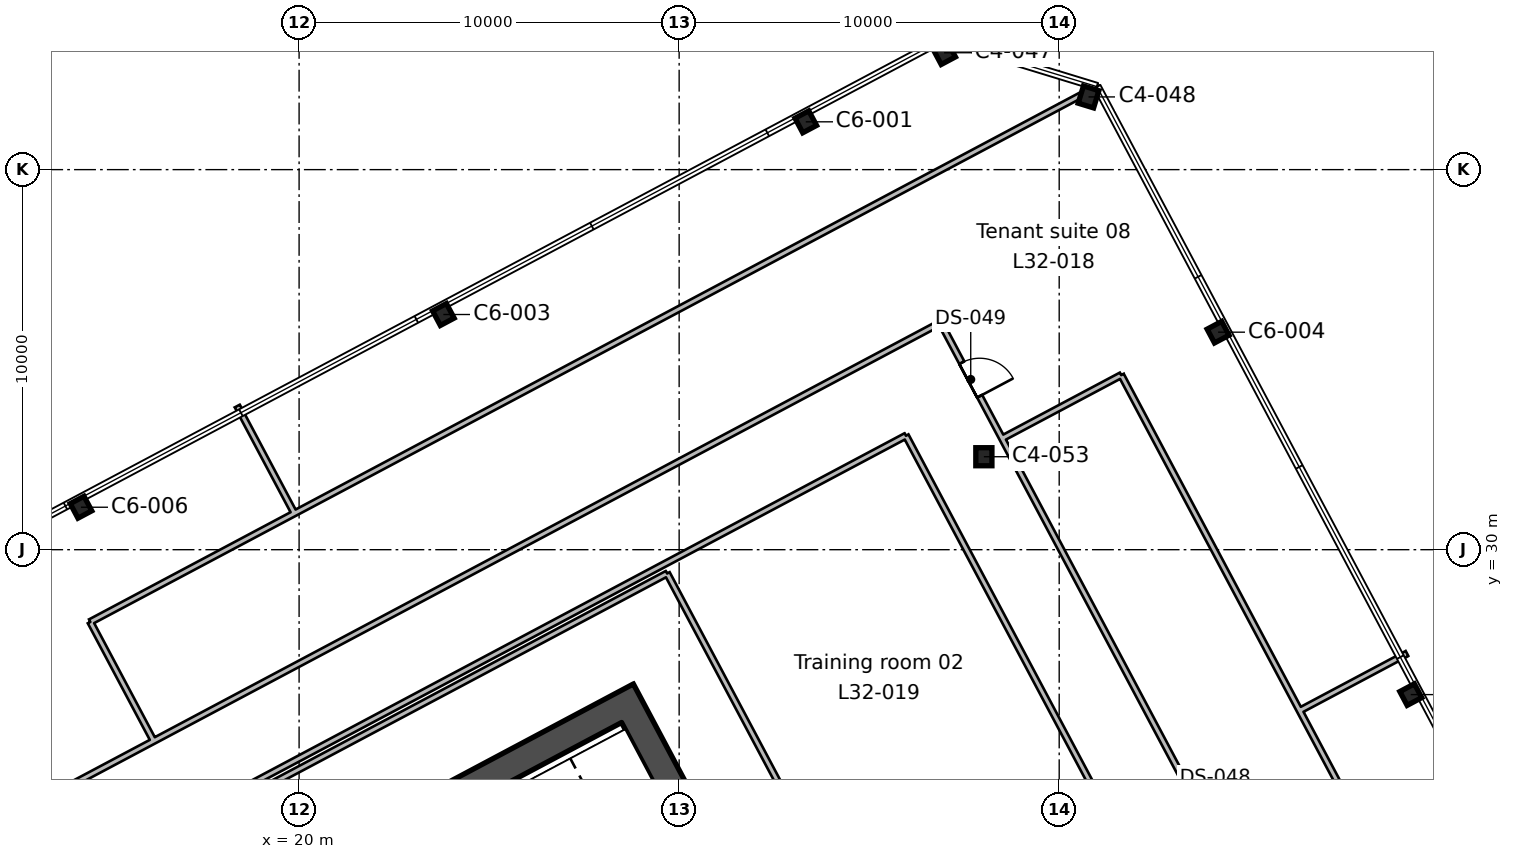
"""IFC4 building model, lengths in metres.
Left out: names, types, materials, properties, quantities, classifications, styles, units other than length and angle.
Written with IfcOpenShell. Run it as: python <this file> out.ifc"""

import sys

from ifc_helpers import new_model, si_unit, direction, frame, frame_2d, origin, origin_2d, place, context, subcontext, project, spatial, rectangle, i_section, extrude, element, fill, save


model = new_model("IFC4")
c1 = context("Model", 3, precision=1e-05, world=origin(), true_north=direction((0.0, 1.0)))
c2 = subcontext(c1, "Body", "Model", "MODEL_VIEW")
j1 = project(units=[si_unit("LENGTHUNIT", "METRE"), si_unit("PLANEANGLEUNIT", "RADIAN")], contexts=[c1])
p1 = place(None, origin())
s1 = spatial("IfcSite", under=j1, at=p1, CompositionType="ELEMENT")
p2 = place(p1, origin())
s2 = spatial("IfcBuilding", under=s1, at=p2, CompositionType="ELEMENT")
p3 = place(p2, frame((0.0, 0.0, 154.2)))
s3 = spatial("IfcBuildingStorey", under=s2, at=p3, CompositionType="ELEMENT", Elevation=154.2)
for number, where, z_axis, x_axis in (
    (1, (49.251, 26.187, 0.0), (0.0, 0.0, 1.0), (-0.469, 0.883, 0.0)),
    (2, (14.261, 31.117, 0.0), (0.0, 0.0, 1.0), (-0.883, -0.469, 0.0)),
):
    element("IfcColumn", number, at=place(p3, frame(where, z_axis=z_axis, x_axis=x_axis)), inside=s3, PredefinedType="COLUMN", context=c2, shape_type="SweptSolid", body=[
        extrude(i_section(OverallWidth=0.412, OverallDepth=0.434, WebThickness=0.036, FlangeThickness=0.057, FilletRadius=0.015, at=origin_2d()), origin(), (0.0, 0.0, 1.0), 4.0),
    ])
p4 = place(p3, frame((38.018, 32.446, 0.0), z_axis=(0.0, 0.0, 1.0), x_axis=(1.0, 0.0, 0.0)))
e3 = element("IfcColumn", 3, at=p4, inside=s3, PredefinedType="COLUMN", context=c2, shape_type="SweptSolid", body=[
    extrude(i_section(OverallWidth=0.424, OverallDepth=0.475, WebThickness=0.048, FlangeThickness=0.077, FilletRadius=0.015, at=origin_2d()), origin(), (0.0, 0.0, 1.0), 4.0),
])
for number, where, z_axis, x_axis in (
    (4, (44.181, 35.723, 0.0), (0.0, 0.0, 1.0), (-0.469, 0.883, 0.0)),
    (5, (23.796, 36.188, 0.0), (0.0, 0.0, 1.0), (-0.883, -0.469, 0.0)),
    (6, (33.332, 41.258, 0.0), (0.0, 0.0, 1.0), (-0.883, -0.469, 0.0)),
):
    element("IfcColumn", number, at=place(p3, frame(where, z_axis=z_axis, x_axis=x_axis)), inside=s3, PredefinedType="COLUMN", context=c2, shape_type="SweptSolid", body=[
        extrude(i_section(OverallWidth=0.412, OverallDepth=0.434, WebThickness=0.036, FlangeThickness=0.057, FilletRadius=0.015, at=origin_2d()), origin(), (0.0, 0.0, 1.0), 4.0),
    ])
for number, where, z_axis, x_axis in (
    (7, (40.772, 41.913, 0.0), (0.0, 0.0, 1.0), (-0.956, 0.292, 0.0)),
    (8, (36.971, 43.076, 0.0), (0.0, 0.0, 1.0), (-0.883, -0.469, 0.0)),
):
    element("IfcColumn", number, at=place(p3, frame(where, z_axis=z_axis, x_axis=x_axis)), inside=s3, PredefinedType="COLUMN", context=c2, shape_type="SweptSolid", body=[
        extrude(i_section(OverallWidth=0.424, OverallDepth=0.475, WebThickness=0.048, FlangeThickness=0.077, FilletRadius=0.015, at=origin_2d()), origin(), (0.0, 0.0, 1.0), 4.0),
    ])
p5 = place(p3, frame((37.713, 8.896, 0.0), z_axis=(0.0, 0.0, 1.0), x_axis=(-0.469469918705, 0.88294846703, 0.0)))
e9 = element("IfcWall", 9, at=p5, inside=s3, PredefinedType="SHEAR", context=c2, shape_type="SweptSolid", body=[
    extrude(rectangle(XDim=19.7, YDim=0.75, at=frame_2d((9.85, 0.0))), origin(), (0.0, 0.0, 1.0), 4.0),
])
p6 = place(p5, frame((10.45, 0.0, 0.0)))
e10 = element("IfcOpeningElement", 10, at=p6, cuts=e9, PredefinedType="OPENING", context=c2, shape_type="SweptSolid", body=[
    extrude(rectangle(XDim=2.4, YDim=2.4, at=frame_2d((1.2, 1.2))), frame((0.0, 0.385, 0.0), z_axis=(0.0, -1.0, 0.0), x_axis=(1.0, 0.0, 0.0)), (0.0, 0.0, 1.0), 0.77),
])
p7 = place(p3, frame((10.474, 16.3, 0.0), z_axis=(0.0, 0.0, 1.0), x_axis=(0.88295010195, 0.469466843842, 0.0)))
e11 = element("IfcWall", 11, at=p7, inside=s3, PredefinedType="SHEAR", context=c2, shape_type="SweptSolid", body=[
    extrude(rectangle(XDim=20.2, YDim=0.75, at=frame_2d((10.1, 0.0))), origin(), (0.0, 0.0, 1.0), 4.0),
])
p8 = place(p3, frame((0.0, 16.366, 0.0), z_axis=(0.0, 0.0, 1.0), x_axis=(0.882949964187, 0.469467102939, 0.0)))
e12 = element("IfcWall", 12, at=p8, inside=s3, PredefinedType="PARTITIONING", context=c2, shape_type="SweptSolid", body=[
    extrude(rectangle(XDim=18.542, YDim=0.15, at=frame_2d((9.271, 0.0))), origin(), (0.0, 0.0, 1.0), 3.64),
])
p9 = place(p3, frame((0.0, 13.874, 0.0), z_axis=(0.0, 0.0, 1.0), x_axis=(0.882942852858, 0.469480477322, 0.0)))
e13 = element("IfcWall", 13, at=p9, inside=s3, PredefinedType="PARTITIONING", context=c2, shape_type="SweptSolid", body=[
    extrude(rectangle(XDim=40.737, YDim=0.15, at=frame_2d((20.368, 0.0))), origin(), (0.0, 0.0, 1.0), 3.64),
])
p10 = place(p9, frame((5.45, 0.0, 0.0)))
e14 = element("IfcOpeningElement", 14, at=p10, cuts=e13, PredefinedType="OPENING", context=c2, shape_type="SweptSolid", body=[
    extrude(rectangle(XDim=1.8, YDim=2.1, at=frame_2d((0.9, 1.05))), frame((0.0, 0.085, 0.0), z_axis=(0.0, -1.0, 0.0), x_axis=(1.0, 0.0, 0.0)), (0.0, 0.0, 1.0), 0.17),
])
p11 = place(p3, frame((35.968, 32.999, 0.0), z_axis=(0.0, 0.0, 1.0), x_axis=(0.469455871296, -0.882955935993, 0.0)))
e15 = element("IfcWall", 15, at=p11, inside=s3, PredefinedType="PARTITIONING", context=c2, shape_type="SweptSolid", body=[
    extrude(rectangle(XDim=22.5, YDim=0.15, at=frame_2d((11.25, 0.0))), origin(), (0.0, 0.0, 1.0), 3.64),
])
p12 = place(p3, frame((40.13, 9.729, 0.0), z_axis=(0.0, 0.0, 1.0), x_axis=(-0.469484128043, 0.882940911679, 0.0)))
e16 = element("IfcWall", 16, at=p12, inside=s3, PredefinedType="PARTITIONING", context=c2, shape_type="SweptSolid", body=[
    extrude(rectangle(XDim=22.25, YDim=0.15, at=frame_2d((11.125, 0.0))), origin(), (0.0, 0.0, 1.0), 3.64),
])
p13 = place(p3, frame((29.684, 29.374, 0.0), z_axis=(0.0, 0.0, 1.0), x_axis=(-0.882945936391, -0.469474678136, 0.0)))
e17 = element("IfcWall", 17, at=p13, inside=s3, PredefinedType="PARTITIONING", context=c2, shape_type="SweptSolid", body=[
    extrude(rectangle(XDim=25.999, YDim=0.15, at=frame_2d((13.0, 0.0))), origin(), (0.0, 0.0, 1.0), 3.64),
])
p14 = place(p3, frame((19.835, 30.933, 0.0), z_axis=(0.0, 0.0, 1.0), x_axis=(-0.882907712877, -0.46954655844, 0.0)))
e18 = element("IfcWall", 18, at=p14, inside=s3, PredefinedType="PARTITIONING", context=c2, shape_type="SweptSolid", body=[
    extrude(rectangle(XDim=6.036, YDim=0.15, at=frame_2d((3.018, 0.0))), origin(), (0.0, 0.0, 1.0), 3.64),
])
p15 = place(p3, frame((14.506, 28.099, 0.0), z_axis=(0.0, 0.0, 1.0), x_axis=(0.469501472662, -0.882931688846, 0.0)))
e19 = element("IfcWall", 19, at=p15, inside=s3, PredefinedType="PARTITIONING", context=c2, shape_type="SweptSolid", body=[
    extrude(rectangle(XDim=3.522, YDim=0.15, at=frame_2d((1.761, 0.0))), origin(), (0.0, 0.0, 1.0), 3.64),
])
p16 = place(p3, frame((38.494, 32.934, 0.0), z_axis=(0.0, 0.0, 1.0), x_axis=(-0.469590631125, 0.882884272801, 0.0)))
e20 = element("IfcWall", 20, at=p16, inside=s3, PredefinedType="PARTITIONING", context=c2, shape_type="SweptSolid", body=[
    extrude(rectangle(XDim=3.443, YDim=0.15, at=frame_2d((1.722, 0.0))), origin(), (0.0, 0.0, 1.0), 3.64),
])
p17 = place(p16, frame((1.25, 0.0, 0.0)))
e21 = element("IfcOpeningElement", 21, at=p17, cuts=e20, PredefinedType="OPENING", context=c2, shape_type="SweptSolid", body=[
    extrude(rectangle(XDim=1.0, YDim=2.1, at=frame_2d((0.5, 1.05))), frame((0.0, 0.085, 0.0), z_axis=(0.0, -1.0, 0.0), x_axis=(1.0, 0.0, 0.0)), (0.0, 0.0, 1.0), 0.17),
])
p18 = place(p3, frame((16.372, 25.071, 0.0), z_axis=(0.0, 0.0, 1.0), x_axis=(0.88294906825, 0.469468787968, 0.0)))
e22 = element("IfcWall", 22, at=p18, inside=s3, PredefinedType="PARTITIONING", context=c2, shape_type="SweptSolid", body=[
    extrude(rectangle(XDim=23.224, YDim=0.15, at=frame_2d((11.612, 0.0))), origin(), (0.0, 0.0, 1.0), 3.64),
])
p19 = place(p3, frame((18.374, 33.78, 0.0), z_axis=(0.0, 0.0, 1.0), x_axis=(0.469685095616, -0.882834022315, 0.0)))
e23 = element("IfcWall", 23, at=p19, inside=s3, PredefinedType="PARTITIONING", context=c2, shape_type="SweptSolid", body=[
    extrude(rectangle(XDim=3.2, YDim=0.15, at=frame_2d((1.6, 0.0))), origin(), (0.0, 0.0, 1.0), 3.64),
])
p20 = place(p3, frame((19.835, 30.933, 0.0), z_axis=(0.0, 0.0, 1.0), x_axis=(0.88295274069, 0.469461880995, 0.0)))
e24 = element("IfcWall", 24, at=p20, inside=s3, PredefinedType="PARTITIONING", context=c2, shape_type="SweptSolid", body=[
    extrude(rectangle(XDim=23.476, YDim=0.15, at=frame_2d((11.738, 0.0))), origin(), (0.0, 0.0, 1.0), 3.64),
])
p21 = place(p3, frame((38.494, 32.934, 0.0), z_axis=(0.0, 0.0, 1.0), x_axis=(0.469489027753, -0.88293830635, 0.0)))
e25 = element("IfcWall", 25, at=p21, inside=s3, PredefinedType="PARTITIONING", context=c2, shape_type="SweptSolid", body=[
    extrude(rectangle(XDim=23.456, YDim=0.15, at=frame_2d((11.728, 0.0))), origin(), (0.0, 0.0, 1.0), 3.64),
])
p22 = place(p21, frame((11.45, 0.0, 0.0)))
e26 = element("IfcOpeningElement", 26, at=p22, cuts=e25, PredefinedType="OPENING", context=c2, shape_type="SweptSolid", body=[
    extrude(rectangle(XDim=1.0, YDim=2.1, at=frame_2d((0.5, 1.05))), frame((0.0, 0.085, 0.0), z_axis=(0.0, -1.0, 0.0), x_axis=(1.0, 0.0, 0.0)), (0.0, 0.0, 1.0), 0.17),
])
p23 = place(p3, frame((46.327, 25.765, 0.0), z_axis=(0.0, 0.0, 1.0), x_axis=(-0.469495547168, 0.882934839719, 0.0)))
e27 = element("IfcWall", 27, at=p23, inside=s3, PredefinedType="PARTITIONING", context=c2, shape_type="SweptSolid", body=[
    extrude(rectangle(XDim=10.0, YDim=0.15, at=frame_2d((5.0, 0.0))), origin(), (0.0, 0.0, 1.0), 3.64),
])
p24 = place(p3, frame((41.632, 34.594, 0.0), z_axis=(0.0, 0.0, 1.0), x_axis=(-0.882969155568, -0.469431006981, 0.0)))
e28 = element("IfcWall", 28, at=p24, inside=s3, PredefinedType="PARTITIONING", context=c2, shape_type="SweptSolid", body=[
    extrude(rectangle(XDim=3.538, YDim=0.15, at=frame_2d((1.769, 0.0))), origin(), (0.0, 0.0, 1.0), 3.64),
])
p25 = place(p3, frame((49.152, 27.268, 0.0), z_axis=(0.0, 0.0, 1.0), x_axis=(-0.882819217955, -0.469712921271, 0.0)))
e29 = element("IfcWall", 29, at=p25, inside=s3, PredefinedType="PARTITIONING", context=c2, shape_type="SweptSolid", body=[
    extrude(rectangle(XDim=3.2, YDim=0.15, at=frame_2d((1.6, 0.0))), origin(), (0.0, 0.0, 1.0), 3.64),
])
p26 = place(p3, frame((46.327, 25.765, 0.0), z_axis=(0.0, 0.0, 1.0), x_axis=(0.46946183233, -0.882952766565, 0.0)))
e30 = element("IfcWall", 30, at=p26, inside=s3, PredefinedType="PARTITIONING", context=c2, shape_type="SweptSolid", body=[
    extrude(rectangle(XDim=11.332, YDim=0.15, at=frame_2d((5.666, 0.0))), origin(), (0.0, 0.0, 1.0), 3.64),
])
p27 = place(p17, frame((1.0, 0.0, 0.0), z_axis=(0.0, 0.0, 1.0), x_axis=(-1.0, 0.0, 0.0)))
e31 = element("IfcDoor", 31, at=p27, inside=s3, OperationType="SINGLE_SWING_RIGHT", PredefinedType="DOOR", context=c2, shape_type="SweptSolid", body=[
    extrude(rectangle(XDim=1.0, YDim=2.1, at=frame_2d((0.5, 1.05))), frame((0.0, 0.025, 0.0), z_axis=(0.0, -1.0, 0.0), x_axis=(1.0, 0.0, 0.0)), (0.0, 0.0, 1.0), 0.05),
])
fill(e21, e31)
save(model, sys.argv[1])
